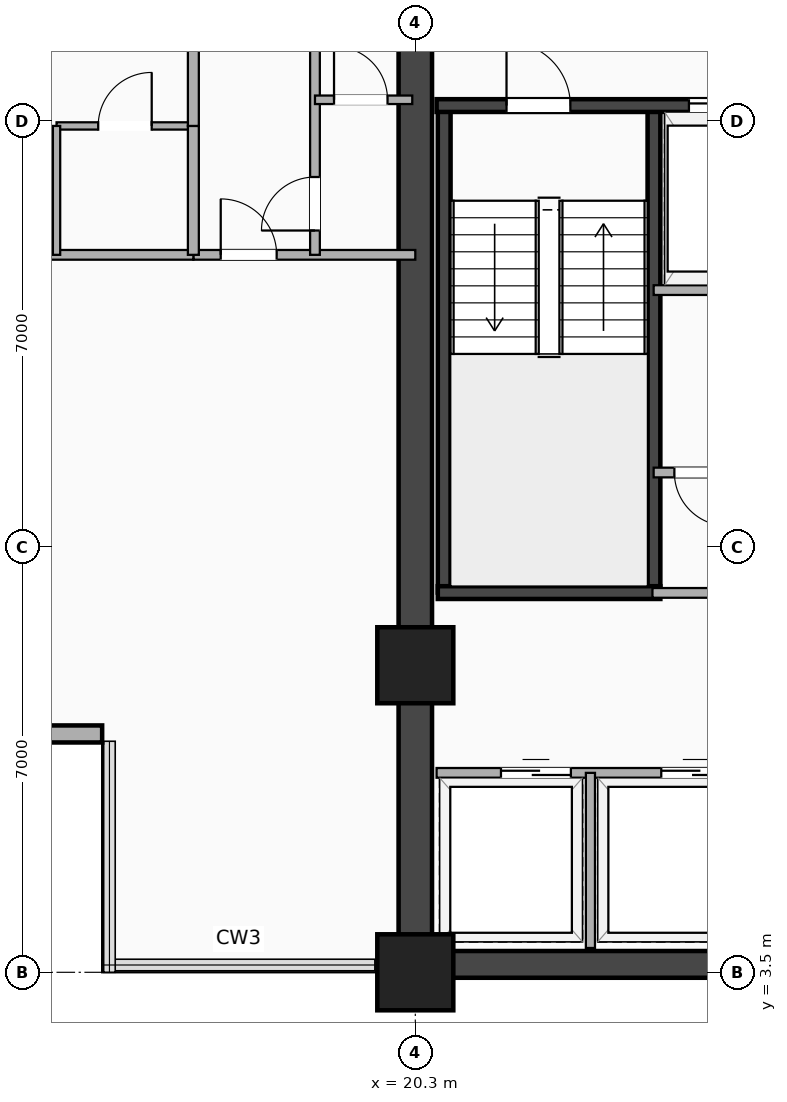
"""IFC4 building model, lengths in metres.
Left out: names, types, materials, properties, quantities, classifications, styles, units other than length and angle.
Written with IfcOpenShell. Run it as: python <this file> out.ifc"""

import sys

from ifc_helpers import new_model, si_unit, direction, frame, frame_2d, origin, origin_2d, place, context, subcontext, project, spatial, rectangle, extrude, element, fill, save


model = new_model("IFC4")
c1 = context("Model", 3, precision=1e-05, world=origin(), true_north=direction((0.0, 1.0)))
c2 = subcontext(c1, "Body", "Model", "MODEL_VIEW")
j1 = project(units=[si_unit("LENGTHUNIT", "METRE"), si_unit("PLANEANGLEUNIT", "RADIAN")], contexts=[c1])
p1 = place(None, origin())
s1 = spatial("IfcSite", under=j1, at=p1, CompositionType="ELEMENT")
p2 = place(p1, origin())
s2 = spatial("IfcBuilding", under=s1, at=p2, CompositionType="ELEMENT")
p3 = place(p2, frame((0.0, 0.0, 98.7)))
s3 = spatial("IfcBuildingStorey", under=s2, at=p3, CompositionType="ELEMENT", Elevation=98.7)
p4 = place(p3, frame((20.3, 3.63, 0.0), z_axis=(0.0, 0.0, 1.0), x_axis=(1.0, 0.0, 0.0)))
e1 = element("IfcWall", 1, at=p4, inside=s3, PredefinedType="SHEAR", context=c2, shape_type="SweptSolid", body=[
    extrude(rectangle(XDim=24.5, YDim=0.44, at=frame_2d((12.25, 0.0))), origin(), (0.0, 0.0, 1.0), 3.24),
])
p5 = place(p3, frame((20.3, 3.5, 0.0), z_axis=(0.0, 0.0, 1.0), x_axis=(0.0, 1.0, 0.0)))
e2 = element("IfcWall", 2, at=p5, inside=s3, PredefinedType="SHEAR", context=c2, shape_type="SweptSolid", body=[
    extrude(rectangle(XDim=16.9, YDim=0.55, at=frame_2d((8.45, 0.0))), origin(), (0.0, 0.0, 1.0), 3.24),
])
for number, where, z_axis, x_axis in (
    (3, (20.775, 9.745, 0.0), (0.0, 0.0, 1.0), (0.0, 1.0, 0.0)),
    (4, (24.225, 9.745, 0.0), (0.0, 0.0, 1.0), (0.0, 1.0, 0.0)),
):
    element("IfcWall", number, at=place(p3, frame(where, z_axis=z_axis, x_axis=x_axis)), inside=s3, PredefinedType="SHEAR", context=c2, shape_type="SweptSolid", body=[
        extrude(rectangle(XDim=8.01, YDim=0.21, at=frame_2d((4.005, 0.0))), origin(), (0.0, 0.0, 1.0), 3.24),
    ])
p6 = place(p3, frame((20.67, 9.745, 0.0), z_axis=(0.0, 0.0, 1.0), x_axis=(1.0, 0.0, 0.0)))
e5 = element("IfcWall", 5, at=p6, inside=s3, PredefinedType="SHEAR", context=c2, shape_type="SweptSolid", body=[
    extrude(rectangle(XDim=3.66, YDim=0.21, at=frame_2d((1.83, 0.0))), origin(), (0.0, 0.0, 1.0), 3.24),
])
p7 = place(p3, frame((20.65, 17.755, 0.0), z_axis=(0.0, 0.0, 1.0), x_axis=(1.0, 0.0, 0.0)))
e6 = element("IfcWall", 6, at=p7, inside=s3, PredefinedType="SHEAR", context=c2, shape_type="SweptSolid", body=[
    extrude(rectangle(XDim=8.3, YDim=0.21, at=frame_2d((4.15, 0.0))), origin(), (0.0, 0.0, 1.0), 3.24),
])
p8 = place(p7, frame((2.2, 0.0, 0.0), z_axis=(0.0, 0.0, 1.0), x_axis=(-1.0, 0.0, 0.0)))
e7 = element("IfcOpeningElement", 7, at=p8, cuts=e6, PredefinedType="OPENING", context=c2, shape_type="SweptSolid", body=[
    extrude(rectangle(XDim=1.05, YDim=2.15, at=frame_2d((0.525, 1.075))), frame((0.0, 0.115, 0.0), z_axis=(0.0, -1.0, 0.0), x_axis=(1.0, 0.0, 0.0)), (0.0, 0.0, 1.0), 0.23),
])
p9 = place(p7, frame((4.15, 0.0, 0.0)))
e8 = element("IfcOpeningElement", 8, at=p9, cuts=e6, PredefinedType="OPENING", context=c2, shape_type="SweptSolid", body=[
    extrude(rectangle(XDim=1.1, YDim=2.18, at=frame_2d((0.55, 1.09))), frame((0.0, 0.115, 0.0), z_axis=(0.0, -1.0, 0.0), x_axis=(1.0, 0.0, 0.0)), (0.0, 0.0, 1.0), 0.23),
])
p10 = place(p7, frame((6.45, 0.0, 0.0)))
e9 = element("IfcOpeningElement", 9, at=p10, cuts=e6, PredefinedType="OPENING", context=c2, shape_type="SweptSolid", body=[
    extrude(rectangle(XDim=1.12, YDim=2.2, at=frame_2d((0.56, 1.1))), frame((0.0, 0.115, 0.0), z_axis=(0.0, -1.0, 0.0), x_axis=(1.0, 0.0, 0.0)), (0.0, 0.0, 1.0), 0.23),
])
for number, where, z_axis, x_axis in (
    (10, (20.3, 3.5, -0.26), (0.0, 0.0, 1.0), (1.0, 0.0, 0.0)),
    (11, (20.3, 8.55, -0.26), (0.0, 0.0, 1.0), (1.0, 0.0, 0.0)),
):
    element("IfcColumn", number, at=place(p3, frame(where, z_axis=z_axis, x_axis=x_axis)), inside=s3, PredefinedType="COLUMN", context=c2, shape_type="SweptSolid", body=[
        extrude(rectangle(XDim=1.25, YDim=1.25, at=origin_2d()), origin(), (0.0, 0.0, 1.0), 3.5),
    ])
p11 = place(p3, frame((11.35, 7.42, 0.0), z_axis=(0.0, 0.0, 1.0), x_axis=(1.0, 0.0, 0.0)))
e12 = element("IfcWall", 12, at=p11, inside=s3, PredefinedType="SOLIDWALL", context=c2, shape_type="SweptSolid", body=[
    extrude(rectangle(XDim=3.8, YDim=0.28, at=frame_2d((1.9, 0.0))), origin(), (0.0, 0.0, 1.0), 3.24),
])
p12 = place(p11, frame((1.025, 0.0, 0.85)))
e13 = element("IfcOpeningElement", 13, at=p12, cuts=e12, PredefinedType="OPENING", context=c2, shape_type="SweptSolid", body=[
    extrude(rectangle(XDim=1.75, YDim=1.65, at=frame_2d((0.875, 0.825))), frame((0.0, 0.15, 0.0), z_axis=(0.0, -1.0, 0.0), x_axis=(1.0, 0.0, 0.0)), (0.0, 0.0, 1.0), 0.3),
])
p13 = place(p3, frame((24.22, 14.72, 0.0), z_axis=(0.0, 0.0, 1.0), x_axis=(1.0, 0.0, 0.0)))
e14 = element("IfcWall", 14, at=p13, inside=s3, PredefinedType="PARTITIONING", context=c2, shape_type="SweptSolid", body=[
    extrude(rectangle(XDim=4.73, YDim=0.16, at=frame_2d((2.365, 0.0))), origin(), (0.0, 0.0, 1.0), 3.24),
])
p14 = place(p3, frame((24.22, 11.72, 0.0), z_axis=(0.0, 0.0, 1.0), x_axis=(1.0, 0.0, 0.0)))
e15 = element("IfcWall", 15, at=p14, inside=s3, PredefinedType="PARTITIONING", context=c2, shape_type="SweptSolid", body=[
    extrude(rectangle(XDim=1.561, YDim=0.16, at=frame_2d((0.781, 0.0))), origin(), (0.0, 0.0, 1.0), 3.24),
])
p15 = place(p14, frame((0.341, 0.0, 0.0)))
e16 = element("IfcOpeningElement", 16, at=p15, cuts=e15, PredefinedType="OPENING", context=c2, shape_type="SweptSolid", body=[
    extrude(rectangle(XDim=0.88, YDim=2.08, at=frame_2d((0.44, 1.04))), frame((0.0, 0.09, 0.0), z_axis=(0.0, -1.0, 0.0), x_axis=(1.0, 0.0, 0.0)), (0.0, 0.0, 1.0), 0.18),
])
p16 = place(p3, frame((20.65, 6.78, 0.0), z_axis=(0.0, 0.0, 1.0), x_axis=(1.0, 0.0, 0.0)))
e17 = element("IfcWall", 17, at=p16, inside=s3, PredefinedType="PARTITIONING", context=c2, shape_type="SweptSolid", body=[
    extrude(rectangle(XDim=8.3, YDim=0.16, at=frame_2d((4.15, 0.0))), origin(), (0.0, 0.0, 1.0), 2.313),
])
p17 = place(p16, frame((3.695, 0.0, 0.0)))
e18 = element("IfcOpeningElement", 18, at=p17, cuts=e17, PredefinedType="OPENING", context=c2, shape_type="SweptSolid", body=[
    extrude(rectangle(XDim=1.15, YDim=2.2, at=frame_2d((0.575, 1.1))), frame((0.0, 0.09, 0.0), z_axis=(0.0, -1.0, 0.0), x_axis=(1.0, 0.0, 0.0)), (0.0, 0.0, 1.0), 0.18),
])
p18 = place(p16, frame((5.492, 0.0, 0.0)))
e19 = element("IfcOpeningElement", 19, at=p18, cuts=e17, PredefinedType="OPENING", context=c2, shape_type="SweptSolid", body=[
    extrude(rectangle(XDim=1.15, YDim=2.2, at=frame_2d((0.575, 1.1))), frame((0.0, 0.09, 0.0), z_axis=(0.0, -1.0, 0.0), x_axis=(1.0, 0.0, 0.0)), (0.0, 0.0, 1.0), 0.18),
])
p19 = place(p16, frame((1.059, 0.0, 0.0)))
e20 = element("IfcOpeningElement", 20, at=p19, cuts=e17, PredefinedType="OPENING", context=c2, shape_type="SweptSolid", body=[
    extrude(rectangle(XDim=1.15, YDim=2.2, at=frame_2d((0.575, 1.1))), frame((0.0, 0.09, 0.0), z_axis=(0.0, -1.0, 0.0), x_axis=(1.0, 0.0, 0.0)), (0.0, 0.0, 1.0), 0.18),
])
p20 = place(p3, frame((23.18, 3.9, 0.0), z_axis=(0.0, 0.0, 1.0), x_axis=(0.0, 1.0, 0.0)))
e21 = element("IfcWall", 21, at=p20, inside=s3, PredefinedType="PARTITIONING", context=c2, shape_type="SweptSolid", body=[
    extrude(rectangle(XDim=2.88, YDim=0.15, at=frame_2d((1.44, 0.0))), origin(), (0.0, 0.0, 1.0), 3.24),
])
p21 = place(p3, frame((24.2, 9.74, 0.0), z_axis=(0.0, 0.0, 1.0), x_axis=(1.0, 0.0, 0.0)))
e22 = element("IfcWall", 22, at=p21, inside=s3, PredefinedType="PARTITIONING", context=c2, shape_type="SweptSolid", body=[
    extrude(rectangle(XDim=4.8, YDim=0.16, at=frame_2d((2.4, 0.0))), origin(), (0.0, 0.0, 1.0), 3.24),
])
p22 = place(p21, frame((1.85, 0.0, 0.0)))
e23 = element("IfcOpeningElement", 23, at=p22, cuts=e22, PredefinedType="OPENING", context=c2, shape_type="SweptSolid", body=[
    extrude(rectangle(XDim=1.1, YDim=2.15, at=frame_2d((0.55, 1.075))), frame((0.0, 0.09, 0.0), z_axis=(0.0, -1.0, 0.0), x_axis=(1.0, 0.0, 0.0)), (0.0, 0.0, 1.0), 0.18),
])
p23 = place(p3, frame((16.65, 15.3, 0.0), z_axis=(0.0, 0.0, 1.0), x_axis=(1.0, 0.0, 0.0)))
e24 = element("IfcWall", 24, at=p23, inside=s3, PredefinedType="PARTITIONING", context=c2, shape_type="SweptSolid", body=[
    extrude(rectangle(XDim=3.65, YDim=0.16, at=frame_2d((1.825, 0.0))), origin(), (0.0, 0.0, 1.0), 2.313),
])
p24 = place(p23, frame((1.37, 0.0, 0.0), z_axis=(0.0, 0.0, 1.0), x_axis=(-1.0, 0.0, 0.0)))
e25 = element("IfcOpeningElement", 25, at=p24, cuts=e24, PredefinedType="OPENING", context=c2, shape_type="SweptSolid", body=[
    extrude(rectangle(XDim=0.92, YDim=2.08, at=frame_2d((0.46, 1.04))), frame((0.0, 0.09, 0.0), z_axis=(0.0, -1.0, 0.0), x_axis=(1.0, 0.0, 0.0)), (0.0, 0.0, 1.0), 0.18),
])
p25 = place(p3, frame((18.65, 15.3, 0.0), z_axis=(0.0, 0.0, 1.0), x_axis=(0.0, 1.0, 0.0)))
e26 = element("IfcWall", 26, at=p25, inside=s3, PredefinedType="PARTITIONING", context=c2, shape_type="SweptSolid", body=[
    extrude(rectangle(XDim=5.12, YDim=0.16, at=frame_2d((2.56, 0.0))), origin(), (0.0, 0.0, 1.0), 2.313),
])
p26 = place(p25, frame((1.28, 0.0, 0.0), z_axis=(0.0, 0.0, 1.0), x_axis=(-1.0, 0.0, 0.0)))
e27 = element("IfcOpeningElement", 27, at=p26, cuts=e26, PredefinedType="OPENING", context=c2, shape_type="SweptSolid", body=[
    extrude(rectangle(XDim=0.88, YDim=2.08, at=frame_2d((0.44, 1.04))), frame((0.0, 0.09, 0.0), z_axis=(0.0, -1.0, 0.0), x_axis=(1.0, 0.0, 0.0)), (0.0, 0.0, 1.0), 0.18),
])
p27 = place(p3, frame((11.47, 15.3, 0.0), z_axis=(0.0, 0.0, 1.0), x_axis=(1.0, 0.0, 0.0)))
e28 = element("IfcWall", 28, at=p27, inside=s3, PredefinedType="PARTITIONING", context=c2, shape_type="SweptSolid", body=[
    extrude(rectangle(XDim=5.18, YDim=0.16, at=frame_2d((2.59, 0.0))), origin(), (0.0, 0.0, 1.0), 2.603),
])
p28 = place(p3, frame((14.4, 17.42, 0.0), z_axis=(0.0, 0.0, 1.0), x_axis=(1.0, 0.0, 0.0)))
e29 = element("IfcWall", 29, at=p28, inside=s3, PredefinedType="PARTITIONING", context=c2, shape_type="SweptSolid", body=[
    extrude(rectangle(XDim=2.25, YDim=0.12, at=frame_2d((1.125, 0.0))), origin(), (0.0, 0.0, 1.0), 3.24),
])
p29 = place(p28, frame((1.565, 0.0, 0.0), z_axis=(0.0, 0.0, 1.0), x_axis=(-1.0, 0.0, 0.0)))
e30 = element("IfcOpeningElement", 30, at=p29, cuts=e29, PredefinedType="OPENING", context=c2, shape_type="SweptSolid", body=[
    extrude(rectangle(XDim=0.88, YDim=2.08, at=frame_2d((0.44, 1.04))), frame((0.0, 0.07, 0.0), z_axis=(0.0, -1.0, 0.0), x_axis=(1.0, 0.0, 0.0)), (0.0, 0.0, 1.0), 0.14),
])
p30 = place(p3, frame((14.4, 15.3, 0.0), z_axis=(0.0, 0.0, 1.0), x_axis=(0.0, 1.0, 0.0)))
e31 = element("IfcWall", 31, at=p30, inside=s3, PredefinedType="PARTITIONING", context=c2, shape_type="SweptSolid", body=[
    extrude(rectangle(XDim=2.12, YDim=0.12, at=frame_2d((1.06, 0.0))), origin(), (0.0, 0.0, 1.0), 2.922),
])
p31 = place(p3, frame((16.65, 15.3, 0.0), z_axis=(0.0, 0.0, 1.0), x_axis=(0.0, 1.0, 0.0)))
e32 = element("IfcWall", 32, at=p31, inside=s3, PredefinedType="PARTITIONING", context=c2, shape_type="SweptSolid", body=[
    extrude(rectangle(XDim=2.12, YDim=0.18, at=frame_2d((1.06, 0.0))), origin(), (0.0, 0.0, 1.0), 2.922),
])
p32 = place(p3, frame((16.65, 17.42, 0.0), z_axis=(0.0, 0.0, 1.0), x_axis=(0.0, 1.0, 0.0)))
e33 = element("IfcWall", 33, at=p32, inside=s3, PredefinedType="PARTITIONING", context=c2, shape_type="SweptSolid", body=[
    extrude(rectangle(XDim=3.78, YDim=0.18, at=frame_2d((1.89, 0.0))), origin(), (0.0, 0.0, 1.0), 2.313),
])
p33 = place(p32, frame((1.415, 0.0, 0.0)))
e34 = element("IfcOpeningElement", 34, at=p33, cuts=e33, PredefinedType="OPENING", context=c2, shape_type="SweptSolid", body=[
    extrude(rectangle(XDim=0.95, YDim=2.15, at=frame_2d((0.475, 1.075))), frame((0.0, 0.1, 0.0), z_axis=(0.0, -1.0, 0.0), x_axis=(1.0, 0.0, 0.0)), (0.0, 0.0, 1.0), 0.2),
])
p34 = place(p3, frame((18.65, 17.85, 0.0), z_axis=(0.0, 0.0, 1.0), x_axis=(1.0, 0.0, 0.0)))
e35 = element("IfcWall", 35, at=p34, inside=s3, PredefinedType="PARTITIONING", context=c2, shape_type="SweptSolid", body=[
    extrude(rectangle(XDim=1.6, YDim=0.14, at=frame_2d((0.8, 0.0))), origin(), (0.0, 0.0, 1.0), 2.313),
])
p35 = place(p34, frame((1.193, 0.0, 0.0), z_axis=(0.0, 0.0, 1.0), x_axis=(-1.0, 0.0, 0.0)))
e36 = element("IfcOpeningElement", 36, at=p35, cuts=e35, PredefinedType="OPENING", context=c2, shape_type="SweptSolid", body=[
    extrude(rectangle(XDim=0.88, YDim=2.08, at=frame_2d((0.44, 1.04))), frame((0.0, 0.08, 0.0), z_axis=(0.0, -1.0, 0.0), x_axis=(1.0, 0.0, 0.0)), (0.0, 0.0, 1.0), 0.16),
])
p36 = place(p8, origin())
e37 = element("IfcDoor", 37, at=p36, inside=s3, OperationType="SINGLE_SWING_LEFT", PredefinedType="DOOR", context=c2, shape_type="SweptSolid", body=[
    extrude(rectangle(XDim=1.05, YDim=2.15, at=frame_2d((0.525, 1.075))), frame((0.0, 0.025, 0.0), z_axis=(0.0, -1.0, 0.0), x_axis=(1.0, 0.0, 0.0)), (0.0, 0.0, 1.0), 0.05),
])
fill(e7, e37)
p37 = place(p9, origin())
e38 = element("IfcDoor", 38, at=p37, inside=s3, OperationType="DOUBLE_DOOR_SLIDING", PredefinedType="DOOR", context=c2, shape_type="SweptSolid", body=[
    extrude(rectangle(XDim=1.1, YDim=2.18, at=frame_2d((0.55, 1.09))), frame((0.0, 0.025, 0.0), z_axis=(0.0, -1.0, 0.0), x_axis=(1.0, 0.0, 0.0)), (0.0, 0.0, 1.0), 0.05),
])
fill(e8, e38)
p38 = place(p15, origin())
e39 = element("IfcDoor", 39, at=p38, inside=s3, OperationType="SINGLE_SWING_RIGHT", PredefinedType="DOOR", context=c2, shape_type="SweptSolid", body=[
    extrude(rectangle(XDim=0.88, YDim=2.08, at=frame_2d((0.44, 1.04))), frame((0.0, 0.025, 0.0), z_axis=(0.0, -1.0, 0.0), x_axis=(1.0, 0.0, 0.0)), (0.0, 0.0, 1.0), 0.05),
])
fill(e16, e39)
p39 = place(p17, origin())
e40 = element("IfcDoor", 40, at=p39, inside=s3, OperationType="DOUBLE_DOOR_SLIDING", PredefinedType="DOOR", context=c2, shape_type="SweptSolid", body=[
    extrude(rectangle(XDim=1.15, YDim=2.2, at=frame_2d((0.575, 1.1))), frame((0.0, 0.025, 0.0), z_axis=(0.0, -1.0, 0.0), x_axis=(1.0, 0.0, 0.0)), (0.0, 0.0, 1.0), 0.05),
])
fill(e18, e40)
p40 = place(p19, origin())
e41 = element("IfcDoor", 41, at=p40, inside=s3, OperationType="DOUBLE_DOOR_SLIDING", PredefinedType="DOOR", context=c2, shape_type="SweptSolid", body=[
    extrude(rectangle(XDim=1.15, YDim=2.2, at=frame_2d((0.575, 1.1))), frame((0.0, 0.025, 0.0), z_axis=(0.0, -1.0, 0.0), x_axis=(1.0, 0.0, 0.0)), (0.0, 0.0, 1.0), 0.05),
])
fill(e20, e41)
p41 = place(p24, origin())
e42 = element("IfcDoor", 42, at=p41, inside=s3, OperationType="SINGLE_SWING_LEFT", PredefinedType="DOOR", context=c2, shape_type="SweptSolid", body=[
    extrude(rectangle(XDim=0.92, YDim=2.08, at=frame_2d((0.46, 1.04))), frame((0.0, 0.025, 0.0), z_axis=(0.0, -1.0, 0.0), x_axis=(1.0, 0.0, 0.0)), (0.0, 0.0, 1.0), 0.05),
])
fill(e25, e42)
p42 = place(p26, origin())
e43 = element("IfcDoor", 43, at=p42, inside=s3, OperationType="SINGLE_SWING_LEFT", PredefinedType="DOOR", context=c2, shape_type="SweptSolid", body=[
    extrude(rectangle(XDim=0.88, YDim=2.08, at=frame_2d((0.44, 1.04))), frame((0.0, 0.025, 0.0), z_axis=(0.0, -1.0, 0.0), x_axis=(1.0, 0.0, 0.0)), (0.0, 0.0, 1.0), 0.05),
])
fill(e27, e43)
p43 = place(p29, origin())
e44 = element("IfcDoor", 44, at=p43, inside=s3, OperationType="SINGLE_SWING_RIGHT", PredefinedType="DOOR", context=c2, shape_type="SweptSolid", body=[
    extrude(rectangle(XDim=0.88, YDim=2.08, at=frame_2d((0.44, 1.04))), frame((0.0, 0.025, 0.0), z_axis=(0.0, -1.0, 0.0), x_axis=(1.0, 0.0, 0.0)), (0.0, 0.0, 1.0), 0.05),
])
fill(e30, e44)
p44 = place(p35, origin())
e45 = element("IfcDoor", 45, at=p44, inside=s3, OperationType="SINGLE_SWING_LEFT", PredefinedType="DOOR", context=c2, shape_type="SweptSolid", body=[
    extrude(rectangle(XDim=0.88, YDim=2.08, at=frame_2d((0.44, 1.04))), frame((0.0, 0.025, 0.0), z_axis=(0.0, -1.0, 0.0), x_axis=(1.0, 0.0, 0.0)), (0.0, 0.0, 1.0), 0.05),
])
fill(e36, e45)
save(model, sys.argv[1])
